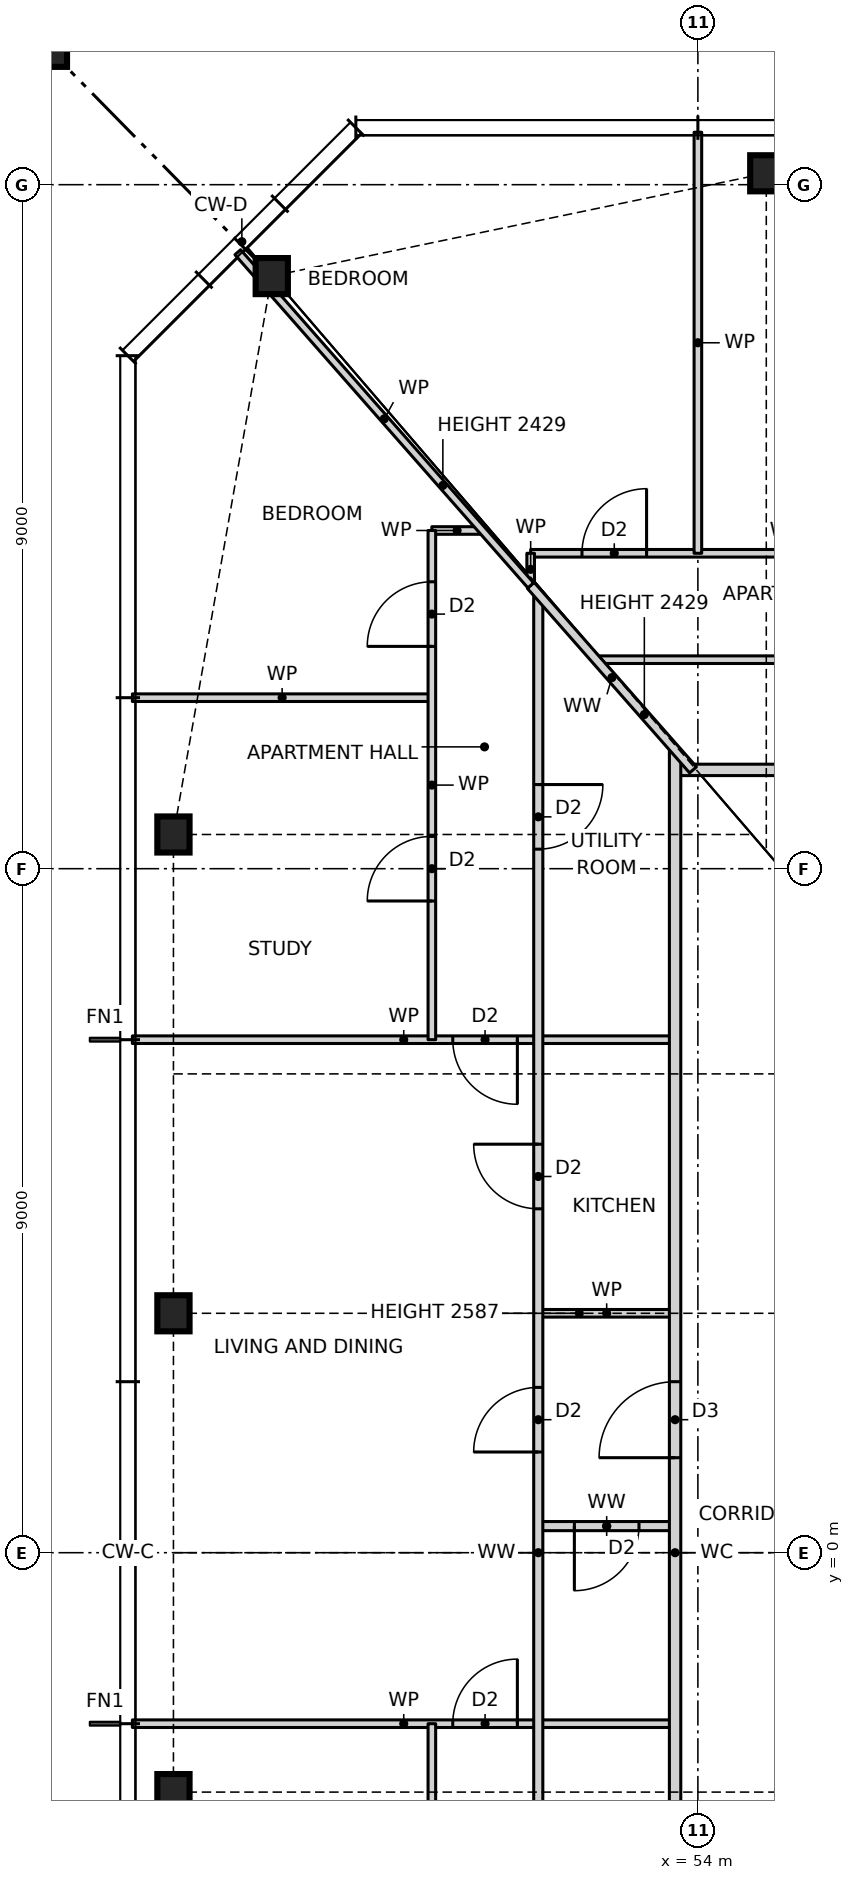
"""IFC4 building model, lengths in metres.
Left out: names, types, materials, properties, quantities, classifications, styles, units other than length and angle.
Written with IfcOpenShell. Run it as: python <this file> out.ifc"""

import sys

from ifc_helpers import new_model, si_unit, direction, frame, frame_2d, origin, origin_2d, place, context, subcontext, project, spatial, rectangle, hollow_rectangle, i_section, extrude, element, fill, save


model = new_model("IFC4")
c1 = context("Model", 3, precision=1e-05, world=origin(), true_north=direction((0.0, 1.0)))
c2 = subcontext(c1, "Body", "Model", "MODEL_VIEW")
j1 = project(units=[si_unit("LENGTHUNIT", "METRE"), si_unit("PLANEANGLEUNIT", "RADIAN")], contexts=[c1])
p1 = place(None, origin())
s1 = spatial("IfcSite", under=j1, at=p1, CompositionType="ELEMENT")
p2 = place(p1, origin())
s2 = spatial("IfcBuilding", under=s1, at=p2, CompositionType="ELEMENT")
p3 = place(p2, frame((0.0, 0.0, 25.5)))
s3 = spatial("IfcBuildingStorey", under=s2, at=p3, CompositionType="ELEMENT", Elevation=25.5)
for number, where, z_axis, x_axis in (
    (1, (54.9, 18.15, 0.0), (0.0, 0.0, 1.0), (1.0, 0.0, 0.0)),
    (2, (48.394, 16.797, 0.0), (0.0, 0.0, 1.0), (1.0, 0.0, 0.0)),
    (3, (47.1, 9.45, 0.0), (0.0, 0.0, 1.0), (1.0, 0.0, 0.0)),
    (4, (47.1, 3.15, 0.0), (0.0, 0.0, 1.0), (1.0, 0.0, 0.0)),
    (5, (47.1, -3.15, 0.0), (0.0, 0.0, 1.0), (1.0, 0.0, 0.0)),
):
    element("IfcColumn", number, at=place(p3, frame(where, z_axis=z_axis, x_axis=x_axis)), inside=s3, PredefinedType="COLUMN", context=c2, shape_type="SweptSolid", body=[
        extrude(i_section(OverallWidth=0.424, OverallDepth=0.475, WebThickness=0.048, FlangeThickness=0.077, at=origin_2d()), origin(), (0.0, 0.0, 1.0), 3.5),
    ])
p4 = place(p3, frame((45.1, 20.15, 0.0), z_axis=(0.0, 0.0, 1.0), x_axis=(1.0, 0.0, 0.0)))
e6 = element("IfcColumn", 6, at=p4, inside=s3, PredefinedType="COLUMN", context=c2, shape_type="SweptSolid", body=[
    extrude(hollow_rectangle(XDim=1.2, YDim=1.2, WallThickness=0.07, at=origin_2d()), origin(), (0.0, 0.0, 1.0), 3.5),
])
p5 = place(p3, frame((46.56, -2.25, 0.0), z_axis=(0.0, 0.0, 1.0), x_axis=(1.0, 0.0, 0.0)))
e7 = element("IfcWall", 7, at=p5, inside=s3, PredefinedType="PARTITIONING", context=c2, shape_type="SweptSolid", body=[
    extrude(rectangle(XDim=7.14, YDim=0.1, at=frame_2d((3.57, 0.0))), origin(), (0.0, 0.0, 1.0), 3.27),
])
p6 = place(p5, frame((4.215, 0.0, 0.0)))
e8 = element("IfcOpeningElement", 8, at=p6, cuts=e7, PredefinedType="OPENING", context=c2, shape_type="SweptSolid", body=[
    extrude(rectangle(XDim=0.85, YDim=2.1, at=frame_2d((0.425, 1.05))), frame((0.0, 0.06, 0.0), z_axis=(0.0, -1.0, 0.0), x_axis=(1.0, 0.0, 0.0)), (0.0, 0.0, 1.0), 0.12),
])
p7 = place(p3, frame((51.9, 0.35, 0.0), z_axis=(0.0, 0.0, 1.0), x_axis=(1.0, 0.0, 0.0)))
e9 = element("IfcWall", 9, at=p7, inside=s3, PredefinedType="PARTITIONING", context=c2, shape_type="SweptSolid", body=[
    extrude(rectangle(XDim=1.8, YDim=0.12, at=frame_2d((0.9, 0.0))), origin(), (0.0, 0.0, 1.0), 3.27),
])
p8 = place(p7, frame((0.475, 0.0, 0.0)))
e10 = element("IfcOpeningElement", 10, at=p8, cuts=e9, PredefinedType="OPENING", context=c2, shape_type="SweptSolid", body=[
    extrude(rectangle(XDim=0.85, YDim=2.1, at=frame_2d((0.425, 1.05))), frame((0.0, 0.07, 0.0), z_axis=(0.0, -1.0, 0.0), x_axis=(1.0, 0.0, 0.0)), (0.0, 0.0, 1.0), 0.14),
])
p9 = place(p3, frame((51.9, 3.15, 0.0), z_axis=(0.0, 0.0, 1.0), x_axis=(1.0, 0.0, 0.0)))
e11 = element("IfcWall", 11, at=p9, inside=s3, PredefinedType="PARTITIONING", context=c2, shape_type="SweptSolid", body=[
    extrude(rectangle(XDim=1.8, YDim=0.1, at=frame_2d((0.9, 0.0))), origin(), (0.0, 0.0, 1.0), 2.587),
])
p10 = place(p3, frame((46.56, 6.75, 0.0), z_axis=(0.0, 0.0, 1.0), x_axis=(1.0, 0.0, 0.0)))
e12 = element("IfcWall", 12, at=p10, inside=s3, PredefinedType="PARTITIONING", context=c2, shape_type="SweptSolid", body=[
    extrude(rectangle(XDim=7.14, YDim=0.1, at=frame_2d((3.57, 0.0))), origin(), (0.0, 0.0, 1.0), 3.27),
])
p11 = place(p10, frame((4.215, 0.0, 0.0)))
e13 = element("IfcOpeningElement", 13, at=p11, cuts=e12, PredefinedType="OPENING", context=c2, shape_type="SweptSolid", body=[
    extrude(rectangle(XDim=0.85, YDim=2.1, at=frame_2d((0.425, 1.05))), frame((0.0, 0.06, 0.0), z_axis=(0.0, -1.0, 0.0), x_axis=(1.0, 0.0, 0.0)), (0.0, 0.0, 1.0), 0.12),
])
p12 = place(p3, frame((53.7, 10.3, 0.0), z_axis=(0.0, 0.0, 1.0), x_axis=(1.0, 0.0, 0.0)))
e14 = element("IfcWall", 14, at=p12, inside=s3, PredefinedType="PARTITIONING", context=c2, shape_type="SweptSolid", body=[
    extrude(rectangle(XDim=18.6, YDim=0.15, at=frame_2d((9.3, 0.0))), origin(), (0.0, 0.0, 1.0), 3.27),
])
p13 = place(p12, frame((8.3, 0.0, 0.0)))
e15 = element("IfcOpeningElement", 15, at=p13, cuts=e14, PredefinedType="OPENING", context=c2, shape_type="SweptSolid", body=[
    extrude(rectangle(XDim=1.0, YDim=2.1, at=frame_2d((0.5, 1.05))), frame((0.0, 0.085, 0.0), z_axis=(0.0, -1.0, 0.0), x_axis=(1.0, 0.0, 0.0)), (0.0, 0.0, 1.0), 0.17),
])
p14 = place(p3, frame((46.56, 11.25, 0.0), z_axis=(0.0, 0.0, 1.0), x_axis=(1.0, 0.0, 0.0)))
e16 = element("IfcWall", 16, at=p14, inside=s3, PredefinedType="PARTITIONING", context=c2, shape_type="SweptSolid", body=[
    extrude(rectangle(XDim=3.94, YDim=0.1, at=frame_2d((1.97, 0.0))), origin(), (0.0, 0.0, 1.0), 3.27),
])
p15 = place(p3, frame((52.66, 11.75, 0.0), z_axis=(0.0, 0.0, 1.0), x_axis=(1.0, 0.0, 0.0)))
e17 = element("IfcWall", 17, at=p15, inside=s3, PredefinedType="PARTITIONING", context=c2, shape_type="SweptSolid", body=[
    extrude(rectangle(XDim=20.68, YDim=0.1, at=frame_2d((10.34, 0.0))), origin(), (0.0, 0.0, 1.0), 3.27),
])
p16 = place(p15, frame((12.615, 0.0, 0.0)))
e18 = element("IfcOpeningElement", 18, at=p16, cuts=e17, PredefinedType="OPENING", context=c2, shape_type="SweptSolid", body=[
    extrude(rectangle(XDim=0.85, YDim=2.1, at=frame_2d((0.425, 1.05))), frame((0.0, 0.06, 0.0), z_axis=(0.0, -1.0, 0.0), x_axis=(1.0, 0.0, 0.0)), (0.0, 0.0, 1.0), 0.12),
])
p17 = place(p15, frame((9.415, 0.0, 0.0)))
e19 = element("IfcOpeningElement", 19, at=p17, cuts=e17, PredefinedType="OPENING", context=c2, shape_type="SweptSolid", body=[
    extrude(rectangle(XDim=0.85, YDim=2.1, at=frame_2d((0.425, 1.05))), frame((0.0, 0.06, 0.0), z_axis=(0.0, -1.0, 0.0), x_axis=(1.0, 0.0, 0.0)), (0.0, 0.0, 1.0), 0.12),
])
p18 = place(p15, frame((17.335, 0.0, 0.0)))
e20 = element("IfcOpeningElement", 20, at=p18, cuts=e17, PredefinedType="OPENING", context=c2, shape_type="SweptSolid", body=[
    extrude(rectangle(XDim=0.85, YDim=2.1, at=frame_2d((0.425, 1.05))), frame((0.0, 0.06, 0.0), z_axis=(0.0, -1.0, 0.0), x_axis=(1.0, 0.0, 0.0)), (0.0, 0.0, 1.0), 0.12),
])
p19 = place(p15, frame((2.495, 0.0, 0.0)))
e21 = element("IfcOpeningElement", 21, at=p19, cuts=e17, PredefinedType="OPENING", context=c2, shape_type="SweptSolid", body=[
    extrude(rectangle(XDim=0.85, YDim=2.1, at=frame_2d((0.425, 1.05))), frame((0.0, 0.06, 0.0), z_axis=(0.0, -1.0, 0.0), x_axis=(1.0, 0.0, 0.0)), (0.0, 0.0, 1.0), 0.12),
])
p20 = place(p3, frame((51.8, 13.15, 0.0), z_axis=(0.0, 0.0, 1.0), x_axis=(1.0, 0.0, 0.0)))
e22 = element("IfcWall", 22, at=p20, inside=s3, PredefinedType="PARTITIONING", context=c2, shape_type="SweptSolid", body=[
    extrude(rectangle(XDim=6.7, YDim=0.1, at=frame_2d((3.35, 0.0))), origin(), (0.0, 0.0, 1.0), 3.27),
])
p21 = place(p20, frame((4.025, 0.0, 0.0)))
e23 = element("IfcOpeningElement", 23, at=p21, cuts=e22, PredefinedType="OPENING", context=c2, shape_type="SweptSolid", body=[
    extrude(rectangle(XDim=0.85, YDim=2.1, at=frame_2d((0.425, 1.05))), frame((0.0, 0.06, 0.0), z_axis=(0.0, -1.0, 0.0), x_axis=(1.0, 0.0, 0.0)), (0.0, 0.0, 1.0), 0.12),
])
p22 = place(p20, frame((0.675, 0.0, 0.0)))
e24 = element("IfcOpeningElement", 24, at=p22, cuts=e22, PredefinedType="OPENING", context=c2, shape_type="SweptSolid", body=[
    extrude(rectangle(XDim=0.85, YDim=2.1, at=frame_2d((0.425, 1.05))), frame((0.0, 0.06, 0.0), z_axis=(0.0, -1.0, 0.0), x_axis=(1.0, 0.0, 0.0)), (0.0, 0.0, 1.0), 0.12),
])
p23 = place(p3, frame((50.5, 13.45, 0.0), z_axis=(0.0, 0.0, 1.0), x_axis=(1.0, 0.0, 0.0)))
e25 = element("IfcWall", 25, at=p23, inside=s3, PredefinedType="PARTITIONING", context=c2, shape_type="SweptSolid", body=[
    extrude(rectangle(XDim=0.664, YDim=0.1, at=frame_2d((0.332, 0.0))), origin(), (0.0, 0.0, 1.0), 3.27),
])
p24 = place(p3, frame((54.0, 13.15, 0.0), z_axis=(0.0, 0.0, 1.0), x_axis=(0.0, 1.0, 0.0)))
e26 = element("IfcWall", 26, at=p24, inside=s3, PredefinedType="PARTITIONING", context=c2, shape_type="SweptSolid", body=[
    extrude(rectangle(XDim=5.54, YDim=0.1, at=frame_2d((2.77, 0.0))), origin(), (0.0, 0.0, 1.0), 3.27),
])
p25 = place(p3, frame((53.7, -10.568, 0.0), z_axis=(0.0, 0.0, 1.0), x_axis=(0.0, 1.0, 0.0)))
e27 = element("IfcWall", 27, at=p25, inside=s3, PredefinedType="PARTITIONING", context=c2, shape_type="SweptSolid", body=[
    extrude(rectangle(XDim=21.136, YDim=0.15, at=frame_2d((10.568, 0.0))), origin(), (0.0, 0.0, 1.0), 3.27),
])
p26 = place(p25, frame((11.818, 0.0, 0.0)))
e28 = element("IfcOpeningElement", 28, at=p26, cuts=e27, PredefinedType="OPENING", context=c2, shape_type="SweptSolid", body=[
    extrude(rectangle(XDim=1.0, YDim=2.1, at=frame_2d((0.5, 1.05))), frame((0.0, 0.085, 0.0), z_axis=(0.0, -1.0, 0.0), x_axis=(1.0, 0.0, 0.0)), (0.0, 0.0, 1.0), 0.17),
])
p27 = place(p3, frame((51.9, -12.614, 0.0), z_axis=(0.0, 0.0, 1.0), x_axis=(0.0, 1.0, 0.0)))
e29 = element("IfcWall", 29, at=p27, inside=s3, PredefinedType="PARTITIONING", context=c2, shape_type="SweptSolid", body=[
    extrude(rectangle(XDim=25.228, YDim=0.12, at=frame_2d((12.614, 0.0))), origin(), (0.0, 0.0, 1.0), 3.27),
])
p28 = place(p27, frame((17.139, 0.0, 0.0)))
e30 = element("IfcOpeningElement", 30, at=p28, cuts=e29, PredefinedType="OPENING", context=c2, shape_type="SweptSolid", body=[
    extrude(rectangle(XDim=0.85, YDim=2.1, at=frame_2d((0.425, 1.05))), frame((0.0, 0.07, 0.0), z_axis=(0.0, -1.0, 0.0), x_axis=(1.0, 0.0, 0.0)), (0.0, 0.0, 1.0), 0.14),
])
p29 = place(p27, frame((13.939, 0.0, 0.0)))
e31 = element("IfcOpeningElement", 31, at=p29, cuts=e29, PredefinedType="OPENING", context=c2, shape_type="SweptSolid", body=[
    extrude(rectangle(XDim=0.85, YDim=2.1, at=frame_2d((0.425, 1.05))), frame((0.0, 0.07, 0.0), z_axis=(0.0, -1.0, 0.0), x_axis=(1.0, 0.0, 0.0)), (0.0, 0.0, 1.0), 0.14),
])
p30 = place(p27, frame((21.871, 0.0, 0.0)))
e32 = element("IfcOpeningElement", 32, at=p30, cuts=e29, PredefinedType="OPENING", context=c2, shape_type="SweptSolid", body=[
    extrude(rectangle(XDim=0.85, YDim=2.1, at=frame_2d((0.425, 1.05))), frame((0.0, 0.07, 0.0), z_axis=(0.0, -1.0, 0.0), x_axis=(1.0, 0.0, 0.0)), (0.0, 0.0, 1.0), 0.14),
])
p31 = place(p27, frame((7.739, 0.0, 0.0)))
e33 = element("IfcOpeningElement", 33, at=p31, cuts=e29, PredefinedType="OPENING", context=c2, shape_type="SweptSolid", body=[
    extrude(rectangle(XDim=0.85, YDim=2.1, at=frame_2d((0.425, 1.05))), frame((0.0, 0.07, 0.0), z_axis=(0.0, -1.0, 0.0), x_axis=(1.0, 0.0, 0.0)), (0.0, 0.0, 1.0), 0.14),
])
p32 = place(p27, frame((2.557, 0.0, 0.0)))
e34 = element("IfcOpeningElement", 34, at=p32, cuts=e29, PredefinedType="OPENING", context=c2, shape_type="SweptSolid", body=[
    extrude(rectangle(XDim=0.85, YDim=2.1, at=frame_2d((0.425, 1.05))), frame((0.0, 0.07, 0.0), z_axis=(0.0, -1.0, 0.0), x_axis=(1.0, 0.0, 0.0)), (0.0, 0.0, 1.0), 0.14),
])
p33 = place(p3, frame((51.8, 12.727, 0.0), z_axis=(0.0, 0.0, 1.0), x_axis=(0.0, 1.0, 0.0)))
e35 = element("IfcWall", 35, at=p33, inside=s3, PredefinedType="PARTITIONING", context=c2, shape_type="SweptSolid", body=[
    extrude(rectangle(XDim=0.423, YDim=0.1, at=frame_2d((0.211, 0.0))), origin(), (0.0, 0.0, 1.0), 3.27),
])
p34 = place(p3, frame((50.5, -13.45, 0.0), z_axis=(0.0, 0.0, 1.0), x_axis=(0.0, 1.0, 0.0)))
e36 = element("IfcWall", 36, at=p34, inside=s3, PredefinedType="PARTITIONING", context=c2, shape_type="SweptSolid", body=[
    extrude(rectangle(XDim=11.2, YDim=0.1, at=frame_2d((5.6, 0.0))), origin(), (0.0, 0.0, 1.0), 3.27),
])
p35 = place(p34, frame((8.525, 0.0, 0.0)))
e37 = element("IfcOpeningElement", 37, at=p35, cuts=e36, PredefinedType="OPENING", context=c2, shape_type="SweptSolid", body=[
    extrude(rectangle(XDim=0.85, YDim=2.1, at=frame_2d((0.425, 1.05))), frame((0.0, 0.06, 0.0), z_axis=(0.0, -1.0, 0.0), x_axis=(1.0, 0.0, 0.0)), (0.0, 0.0, 1.0), 0.12),
])
p36 = place(p34, frame((4.025, 0.0, 0.0)))
e38 = element("IfcOpeningElement", 38, at=p36, cuts=e36, PredefinedType="OPENING", context=c2, shape_type="SweptSolid", body=[
    extrude(rectangle(XDim=0.85, YDim=2.1, at=frame_2d((0.425, 1.05))), frame((0.0, 0.06, 0.0), z_axis=(0.0, -1.0, 0.0), x_axis=(1.0, 0.0, 0.0)), (0.0, 0.0, 1.0), 0.12),
])
p37 = place(p34, frame((0.675, 0.0, 0.0)))
e39 = element("IfcOpeningElement", 39, at=p37, cuts=e36, PredefinedType="OPENING", context=c2, shape_type="SweptSolid", body=[
    extrude(rectangle(XDim=0.85, YDim=2.1, at=frame_2d((0.425, 1.05))), frame((0.0, 0.06, 0.0), z_axis=(0.0, -1.0, 0.0), x_axis=(1.0, 0.0, 0.0)), (0.0, 0.0, 1.0), 0.12),
])
p38 = place(p3, frame((50.5, 6.75, 0.0), z_axis=(0.0, 0.0, 1.0), x_axis=(0.0, 1.0, 0.0)))
e40 = element("IfcWall", 40, at=p38, inside=s3, PredefinedType="PARTITIONING", context=c2, shape_type="SweptSolid", body=[
    extrude(rectangle(XDim=6.7, YDim=0.1, at=frame_2d((3.35, 0.0))), origin(), (0.0, 0.0, 1.0), 3.27),
])
p39 = place(p38, frame((1.825, 0.0, 0.0)))
e41 = element("IfcOpeningElement", 41, at=p39, cuts=e40, PredefinedType="OPENING", context=c2, shape_type="SweptSolid", body=[
    extrude(rectangle(XDim=0.85, YDim=2.1, at=frame_2d((0.425, 1.05))), frame((0.0, 0.06, 0.0), z_axis=(0.0, -1.0, 0.0), x_axis=(1.0, 0.0, 0.0)), (0.0, 0.0, 1.0), 0.12),
])
p40 = place(p38, frame((5.175, 0.0, 0.0)))
e42 = element("IfcOpeningElement", 42, at=p40, cuts=e40, PredefinedType="OPENING", context=c2, shape_type="SweptSolid", body=[
    extrude(rectangle(XDim=0.85, YDim=2.1, at=frame_2d((0.425, 1.05))), frame((0.0, 0.06, 0.0), z_axis=(0.0, -1.0, 0.0), x_axis=(1.0, 0.0, 0.0)), (0.0, 0.0, 1.0), 0.12),
])
p41 = place(p3, frame((53.936, 10.3, 0.0), z_axis=(0.0, 0.0, 1.0), x_axis=(-0.660384426006, 0.750927699508, 0.0)))
e43 = element("IfcWall", 43, at=p41, inside=s3, PredefinedType="PARTITIONING", context=c2, shape_type="SweptSolid", body=[
    extrude(rectangle(XDim=3.233, YDim=0.12, at=frame_2d((1.616, 0.0))), origin(), (0.0, 0.0, 1.0), 2.429),
])
p42 = place(p3, frame((51.801, 12.728, 0.0), z_axis=(0.0, 0.0, 1.0), x_axis=(-0.660356300202, 0.750952433103, 0.0)))
e44 = element("IfcWall", 44, at=p42, inside=s3, PredefinedType="PARTITIONING", context=c2, shape_type="SweptSolid", body=[
    extrude(rectangle(XDim=5.837, YDim=0.1, at=frame_2d((2.918, 0.0))), origin(), (0.0, 0.0, 1.0), 2.429),
])
p43 = place(p22, origin())
e45 = element("IfcDoor", 45, at=p43, inside=s3, OperationType="SINGLE_SWING_RIGHT", PredefinedType="DOOR", context=c2, shape_type="SweptSolid", body=[
    extrude(rectangle(XDim=0.85, YDim=2.1, at=frame_2d((0.425, 1.05))), frame((0.0, 0.025, 0.0), z_axis=(0.0, -1.0, 0.0), x_axis=(1.0, 0.0, 0.0)), (0.0, 0.0, 1.0), 0.05),
])
fill(e24, e45)
p44 = place(p28, origin())
e46 = element("IfcDoor", 46, at=p44, inside=s3, OperationType="SINGLE_SWING_RIGHT", PredefinedType="DOOR", context=c2, shape_type="SweptSolid", body=[
    extrude(rectangle(XDim=0.85, YDim=2.1, at=frame_2d((0.425, 1.05))), frame((0.0, 0.025, 0.0), z_axis=(0.0, -1.0, 0.0), x_axis=(1.0, 0.0, 0.0)), (0.0, 0.0, 1.0), 0.05),
])
fill(e30, e46)
p45 = place(p26, origin())
e47 = element("IfcDoor", 47, at=p45, inside=s3, OperationType="SINGLE_SWING_LEFT", PredefinedType="DOOR", context=c2, shape_type="SweptSolid", body=[
    extrude(rectangle(XDim=1.0, YDim=2.1, at=frame_2d((0.5, 1.05))), frame((0.0, 0.025, 0.0), z_axis=(0.0, -1.0, 0.0), x_axis=(1.0, 0.0, 0.0)), (0.0, 0.0, 1.0), 0.05),
])
fill(e28, e47)
p46 = place(p29, origin())
e48 = element("IfcDoor", 48, at=p46, inside=s3, OperationType="SINGLE_SWING_LEFT", PredefinedType="DOOR", context=c2, shape_type="SweptSolid", body=[
    extrude(rectangle(XDim=0.85, YDim=2.1, at=frame_2d((0.425, 1.05))), frame((0.0, 0.025, 0.0), z_axis=(0.0, -1.0, 0.0), x_axis=(1.0, 0.0, 0.0)), (0.0, 0.0, 1.0), 0.05),
])
fill(e31, e48)
p47 = place(p8, frame((0.85, 0.0, 0.0), z_axis=(0.0, 0.0, 1.0), x_axis=(-1.0, 0.0, 0.0)))
e49 = element("IfcDoor", 49, at=p47, inside=s3, OperationType="SINGLE_SWING_RIGHT", PredefinedType="DOOR", context=c2, shape_type="SweptSolid", body=[
    extrude(rectangle(XDim=0.85, YDim=2.1, at=frame_2d((0.425, 1.05))), frame((0.0, 0.025, 0.0), z_axis=(0.0, -1.0, 0.0), x_axis=(1.0, 0.0, 0.0)), (0.0, 0.0, 1.0), 0.05),
])
fill(e10, e49)
p48 = place(p11, frame((0.85, 0.0, 0.0), z_axis=(0.0, 0.0, 1.0), x_axis=(-1.0, 0.0, 0.0)))
e50 = element("IfcDoor", 50, at=p48, inside=s3, OperationType="SINGLE_SWING_LEFT", PredefinedType="DOOR", context=c2, shape_type="SweptSolid", body=[
    extrude(rectangle(XDim=0.85, YDim=2.1, at=frame_2d((0.425, 1.05))), frame((0.0, 0.025, 0.0), z_axis=(0.0, -1.0, 0.0), x_axis=(1.0, 0.0, 0.0)), (0.0, 0.0, 1.0), 0.05),
])
fill(e13, e50)
p49 = place(p39, origin())
e51 = element("IfcDoor", 51, at=p49, inside=s3, OperationType="SINGLE_SWING_LEFT", PredefinedType="DOOR", context=c2, shape_type="SweptSolid", body=[
    extrude(rectangle(XDim=0.85, YDim=2.1, at=frame_2d((0.425, 1.05))), frame((0.0, 0.025, 0.0), z_axis=(0.0, -1.0, 0.0), x_axis=(1.0, 0.0, 0.0)), (0.0, 0.0, 1.0), 0.05),
])
fill(e41, e51)
p50 = place(p40, origin())
e52 = element("IfcDoor", 52, at=p50, inside=s3, OperationType="SINGLE_SWING_LEFT", PredefinedType="DOOR", context=c2, shape_type="SweptSolid", body=[
    extrude(rectangle(XDim=0.85, YDim=2.1, at=frame_2d((0.425, 1.05))), frame((0.0, 0.025, 0.0), z_axis=(0.0, -1.0, 0.0), x_axis=(1.0, 0.0, 0.0)), (0.0, 0.0, 1.0), 0.05),
])
fill(e42, e52)
p51 = place(p30, frame((0.85, 0.0, 0.0), z_axis=(0.0, 0.0, 1.0), x_axis=(-1.0, 0.0, 0.0)))
e53 = element("IfcDoor", 53, at=p51, inside=s3, OperationType="SINGLE_SWING_LEFT", PredefinedType="DOOR", context=c2, shape_type="SweptSolid", body=[
    extrude(rectangle(XDim=0.85, YDim=2.1, at=frame_2d((0.425, 1.05))), frame((0.0, 0.025, 0.0), z_axis=(0.0, -1.0, 0.0), x_axis=(1.0, 0.0, 0.0)), (0.0, 0.0, 1.0), 0.05),
])
fill(e32, e53)
p52 = place(p6, origin())
e54 = element("IfcDoor", 54, at=p52, inside=s3, OperationType="SINGLE_SWING_RIGHT", PredefinedType="DOOR", context=c2, shape_type="SweptSolid", body=[
    extrude(rectangle(XDim=0.85, YDim=2.1, at=frame_2d((0.425, 1.05))), frame((0.0, 0.025, 0.0), z_axis=(0.0, -1.0, 0.0), x_axis=(1.0, 0.0, 0.0)), (0.0, 0.0, 1.0), 0.05),
])
fill(e8, e54)
save(model, sys.argv[1])
